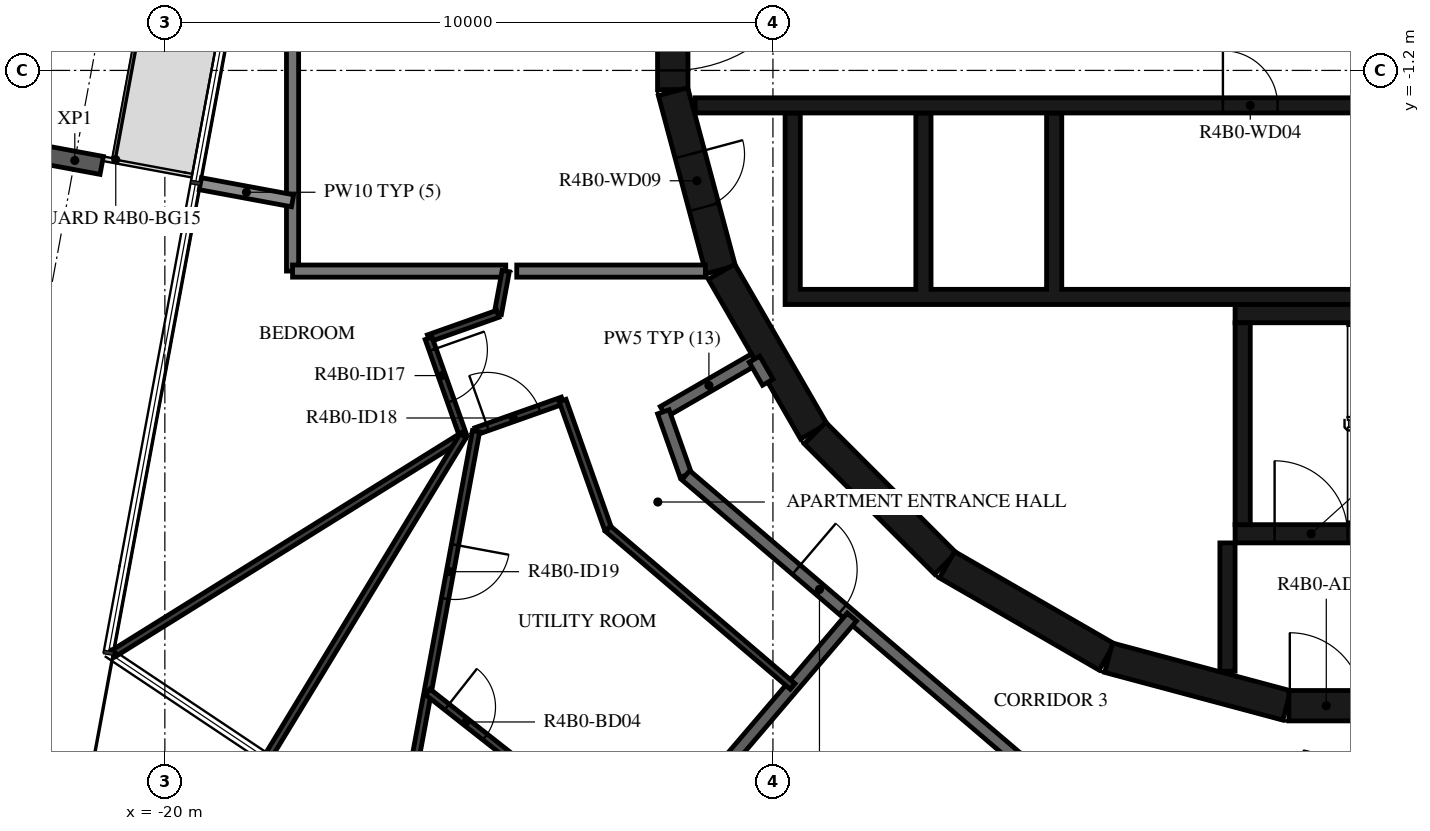
"""IFC4 building model, lengths in metres.
Left out: names, types, materials, properties, quantities, classifications, styles, units other than length and angle.
Written with IfcOpenShell. Run it as: python <this file> out.ifc"""

import sys

from ifc_helpers import new_model, si_unit, direction, frame, frame_2d, origin, origin_2d, place, context, subcontext, project, spatial, polyline, rectangle, i_section, outline, extrude, element, fill, save


model = new_model("IFC4")
c1 = context("Model", 3, precision=1e-05, world=origin(), true_north=direction((0.0, 1.0)))
c2 = subcontext(c1, "Body", "Model", "MODEL_VIEW")
j1 = project(units=[si_unit("LENGTHUNIT", "METRE"), si_unit("PLANEANGLEUNIT", "RADIAN")], contexts=[c1])
p1 = place(None, origin())
s1 = spatial("IfcSite", under=j1, at=p1, CompositionType="ELEMENT")
p2 = place(p1, origin())
s2 = spatial("IfcBuilding", under=s1, at=p2, CompositionType="ELEMENT")
p3 = place(p2, frame((0.0, 0.0, 165.7)))
s3 = spatial("IfcBuildingStorey", under=s2, at=p3, CompositionType="ELEMENT", Elevation=165.7)
p4 = place(p3, frame((-21.481, -2.68, -0.38), z_axis=(0.0, 0.0, 1.0), x_axis=(0.182235967681, 0.983254825609, 0.0)))
e1 = element("IfcColumn", 1, at=p4, inside=s3, PredefinedType="COLUMN", context=c2, shape_type="SweptSolid", body=[
    extrude(i_section(OverallWidth=0.3, OverallDepth=0.9, WebThickness=0.019, FlangeThickness=0.035, FilletRadius=0.03, at=origin_2d()), origin(), (0.0, 0.0, 1.0), 3.5),
])
p5 = place(p3, frame((-11.647, 1.516, 0.0), z_axis=(0.0, 0.0, 1.0), x_axis=(0.0, -1.0, 0.0)))
e2 = element("IfcWall", 2, at=p5, inside=s3, PredefinedType="SHEAR", context=c2, shape_type="SweptSolid", body=[
    extrude(rectangle(XDim=3.033, YDim=0.5, at=frame_2d((1.516, 0.0))), origin(), (0.0, 0.0, 1.0), 3.12),
])
p6 = place(p5, frame((0.316, 0.0, 0.0)))
e3 = element("IfcOpeningElement", 3, at=p6, cuts=e2, PredefinedType="OPENING", context=c2, shape_type="SweptSolid", body=[
    extrude(rectangle(XDim=2.4, YDim=2.1, at=frame_2d((1.2, 1.05))), frame((0.0, 0.26, 0.0), z_axis=(0.0, -1.0, 0.0), x_axis=(1.0, 0.0, 0.0)), (0.0, 0.0, 1.0), 0.52),
])
p7 = place(p3, frame((-11.643, -1.55, 0.0), z_axis=(0.0, 0.0, 1.0), x_axis=(0.258734743916, -0.965948410781, 0.0)))
e4 = element("IfcWall", 4, at=p7, inside=s3, PredefinedType="SHEAR", context=c2, shape_type="SweptSolid", body=[
    extrude(rectangle(XDim=3.033, YDim=0.5, at=frame_2d((1.516, 0.0))), origin(), (0.0, 0.0, 1.0), 3.12),
])
p8 = place(p7, frame((1.066, 0.0, 0.0)))
e5 = element("IfcOpeningElement", 5, at=p8, cuts=e4, PredefinedType="OPENING", context=c2, shape_type="SweptSolid", body=[
    extrude(rectangle(XDim=0.9, YDim=2.1, at=frame_2d((0.45, 1.05))), frame((0.0, 0.26, 0.0), z_axis=(0.0, -1.0, 0.0), x_axis=(1.0, 0.0, 0.0)), (0.0, 0.0, 1.0), 0.52),
])
p9 = place(p3, frame((-10.845, -4.51, 0.0), z_axis=(0.0, 0.0, 1.0), x_axis=(0.500087131594, -0.865975092491, 0.0)))
e6 = element("IfcWall", 6, at=p9, inside=s3, PredefinedType="SHEAR", context=c2, shape_type="SweptSolid", body=[
    extrude(rectangle(XDim=3.033, YDim=0.5, at=frame_2d((1.516, 0.0))), origin(), (0.0, 0.0, 1.0), 3.12),
])
p10 = place(p3, frame((-9.308, -7.164, 0.0), z_axis=(0.0, 0.0, 1.0), x_axis=(0.707106781187, -0.707106781187, 0.0)))
e7 = element("IfcWall", 7, at=p10, inside=s3, PredefinedType="SHEAR", context=c2, shape_type="SweptSolid", body=[
    extrude(rectangle(XDim=3.032, YDim=0.5, at=frame_2d((1.516, 0.0))), origin(), (0.0, 0.0, 1.0), 3.12),
])
for number, where, z_axis, x_axis in (
    (8, (-7.137, -9.329, 0.0), (0.0, 0.0, 1.0), (0.866, -0.5, 0.0)),
    (9, (-4.479, -10.858, 0.0), (0.0, 0.0, 1.0), (0.966, -0.259, 0.0)),
):
    element("IfcWall", number, at=place(p3, frame(where, z_axis=z_axis, x_axis=x_axis)), inside=s3, PredefinedType="SHEAR", context=c2, shape_type="SweptSolid", body=[
        extrude(rectangle(XDim=3.033, YDim=0.5, at=frame_2d((1.516, 0.0))), origin(), (0.0, 0.0, 1.0), 3.12),
    ])
p11 = place(p3, frame((-1.516, -11.647, 0.0), z_axis=(0.0, 0.0, 1.0), x_axis=(1.0, 0.0, 0.0)))
e10 = element("IfcWall", 10, at=p11, inside=s3, PredefinedType="SHEAR", context=c2, shape_type="SweptSolid", body=[
    extrude(rectangle(XDim=3.033, YDim=0.5, at=frame_2d((1.516, 0.0))), origin(), (0.0, 0.0, 1.0), 3.12),
])
p12 = place(p11, frame((0.016, 0.0, 0.0)))
e11 = element("IfcOpeningElement", 11, at=p12, cuts=e10, PredefinedType="OPENING", context=c2, shape_type="SweptSolid", body=[
    extrude(rectangle(XDim=1.2, YDim=2.1, at=frame_2d((0.6, 1.05))), frame((0.0, 0.26, 0.0), z_axis=(0.0, -1.0, 0.0), x_axis=(1.0, 0.0, 0.0)), (0.0, 0.0, 1.0), 0.52),
])
p13 = place(p3, frame((-2.275, -8.67, 0.0), z_axis=(0.0, 0.0, 1.0), x_axis=(0.0, 1.0, 0.0)))
e12 = element("IfcWall", 12, at=p13, inside=s3, PredefinedType="SHEAR", context=c2, shape_type="SweptSolid", body=[
    extrude(rectangle(XDim=3.32, YDim=0.25, at=frame_2d((1.66, 0.0))), origin(), (0.0, 0.0, 1.0), 3.12),
])
p14 = place(p3, frame((-2.4, -5.2, 0.0), z_axis=(0.0, 0.0, 1.0), x_axis=(1.0, 0.0, 0.0)))
e13 = element("IfcWall", 13, at=p14, inside=s3, PredefinedType="SHEAR", context=c2, shape_type="SweptSolid", body=[
    extrude(rectangle(XDim=7.05, YDim=0.3, at=frame_2d((3.525, 0.0))), origin(), (0.0, 0.0, 1.0), 3.12),
])
p15 = place(p3, frame((-2.4, -8.82, 0.0), z_axis=(0.0, 0.0, 1.0), x_axis=(1.0, 0.0, 0.0)))
e14 = element("IfcWall", 14, at=p15, inside=s3, PredefinedType="SHEAR", context=c2, shape_type="SweptSolid", body=[
    extrude(rectangle(XDim=2.5, YDim=0.3, at=frame_2d((1.25, 0.0))), origin(), (0.0, 0.0, 1.0), 3.12),
])
p16 = place(p15, frame((0.65, 0.0, 0.0)))
e15 = element("IfcOpeningElement", 15, at=p16, cuts=e14, PredefinedType="OPENING", context=c2, shape_type="SweptSolid", body=[
    extrude(rectangle(XDim=1.2, YDim=2.1, at=frame_2d((0.6, 1.05))), frame((0.0, 0.16, 0.0), z_axis=(0.0, -1.0, 0.0), x_axis=(1.0, 0.0, 0.0)), (0.0, 0.0, 1.0), 0.32),
])
p17 = place(p3, frame((-2.525, -8.97, 0.0), z_axis=(0.0, 0.0, 1.0), x_axis=(0.0, -1.0, 0.0)))
e16 = element("IfcWall", 16, at=p17, inside=s3, PredefinedType="SHEAR", context=c2, shape_type="SweptSolid", body=[
    extrude(rectangle(XDim=2.11, YDim=0.25, at=frame_2d((1.055, 0.0))), origin(), (0.0, 0.0, 1.0), 3.12),
])
p18 = place(p3, origin())
e17 = element("IfcWall", 17, at=p18, inside=s3, PredefinedType="SHEAR", context=c2, shape_type="SweptSolid", body=[
    extrude(outline(polyline([(9.8, -5.05), (9.8, -4.8), (9.8, -1.9), (9.55, -1.9), (9.55, -4.8), (7.65, -4.8), (7.65, -1.9), (7.4, -1.9), (7.4, -4.8), (5.5, -4.8), (5.5, -1.9), (5.25, -1.9), (5.25, -4.8), (3.35, -4.8), (3.35, -1.9), (3.1, -1.9), (3.1, -4.8), (1.2, -4.8), (1.2, -1.9), (0.95, -1.9), (0.95, -4.8), (-5.25, -4.8), (-5.25, -1.9), (-5.5, -1.9), (-5.5, -4.8), (-7.4, -4.8), (-7.4, -1.9), (-7.65, -1.9), (-7.65, -4.8), (-9.55, -4.8), (-9.55, -1.9), (-9.8, -1.9), (-9.8, -4.8), (-9.8, -5.05), (9.8, -5.05)])), origin(), (0.0, 0.0, 1.0), 3.12),
])
p19 = place(p3, frame((-11.28, -1.775, 0.0), z_axis=(0.0, 0.0, 1.0), x_axis=(1.0, 0.0, 0.0)))
e18 = element("IfcWall", 18, at=p19, inside=s3, PredefinedType="SHEAR", context=c2, shape_type="SweptSolid", body=[
    extrude(rectangle(XDim=14.38, YDim=0.25, at=frame_2d((7.19, 0.0))), origin(), (0.0, 0.0, 1.0), 3.12),
])
p20 = place(p19, frame((12.88, 0.0, 0.0)))
e19 = element("IfcOpeningElement", 19, at=p20, cuts=e18, PredefinedType="OPENING", context=c2, shape_type="SweptSolid", body=[
    extrude(rectangle(XDim=1.1, YDim=2.1, at=frame_2d((0.55, 1.05))), frame((0.0, 0.135, 0.0), z_axis=(0.0, -1.0, 0.0), x_axis=(1.0, 0.0, 0.0)), (0.0, 0.0, 1.0), 0.27),
])
p21 = place(p19, frame((8.68, 0.0, 0.0)))
e20 = element("IfcOpeningElement", 20, at=p21, cuts=e18, PredefinedType="OPENING", context=c2, shape_type="SweptSolid", body=[
    extrude(rectangle(XDim=0.9, YDim=2.1, at=frame_2d((0.45, 1.05))), frame((0.0, 0.135, 0.0), z_axis=(0.0, -1.0, 0.0), x_axis=(1.0, 0.0, 0.0)), (0.0, 0.0, 1.0), 0.27),
])
p22 = place(p3, frame((-10.303, -5.949, 0.0), z_axis=(0.0, 0.0, 1.0), x_axis=(-0.866021168401, -0.500007335828, 0.0)))
e21 = element("IfcWall", 21, at=p22, inside=s3, PredefinedType="STANDARD", context=c2, shape_type="SweptSolid", body=[
    extrude(rectangle(XDim=1.731, YDim=0.2, at=frame_2d((0.865, 0.0))), origin(), (0.0, 0.0, 1.0), 3.12),
])
p23 = place(p3, frame((-11.802, -6.814, 0.0), z_axis=(0.0, 0.0, 1.0), x_axis=(0.333904297771, -0.942606980629, 0.0)))
e22 = element("IfcWall", 22, at=p23, inside=s3, PredefinedType="STANDARD", context=c2, shape_type="SweptSolid", body=[
    extrude(rectangle(XDim=1.107, YDim=0.2, at=frame_2d((0.553, 0.0))), origin(), (0.0, 0.0, 1.0), 3.12),
])
p24 = place(p3, frame((-11.433, -7.858, 0.0), z_axis=(0.0, 0.0, 1.0), x_axis=(0.760412154545, -0.649440801937, 0.0)))
e23 = element("IfcWall", 23, at=p24, inside=s3, PredefinedType="STANDARD", context=c2, shape_type="SweptSolid", body=[
    extrude(rectangle(XDim=7.181, YDim=0.2, at=frame_2d((3.59, 0.0))), origin(), (0.0, 0.0, 1.0), 3.12),
])
p25 = place(p24, frame((2.39, 0.0, 0.0)))
e24 = element("IfcOpeningElement", 24, at=p25, cuts=e23, PredefinedType="OPENING", context=c2, shape_type="SweptSolid", body=[
    extrude(rectangle(XDim=1.0, YDim=2.1, at=frame_2d((0.5, 1.05))), frame((0.0, 0.11, 0.0), z_axis=(0.0, -1.0, 0.0), x_axis=(1.0, 0.0, 0.0)), (0.0, 0.0, 1.0), 0.22),
])
p26 = place(p3, frame((-10.303, -5.949, 0.0), z_axis=(0.0, 0.0, 1.0), x_axis=(0.499980071345, -0.866036909293, 0.0)))
e25 = element("IfcWall", 25, at=p26, inside=s3, PredefinedType="STANDARD", context=c2, shape_type="SweptSolid", body=[
    extrude(rectangle(XDim=0.438, YDim=0.2, at=frame_2d((0.219, 0.0))), origin(), (0.0, 0.0, 1.0), 3.12),
])
p27 = place(p3, frame((-17.9, 4.5, 0.0), z_axis=(0.0, 0.0, 1.0), x_axis=(0.0, -1.0, 0.0)))
e26 = element("IfcWall", 26, at=p27, inside=s3, PredefinedType="STANDARD", context=c2, shape_type="SweptSolid", body=[
    extrude(rectangle(XDim=9.0, YDim=0.2, at=frame_2d((4.5, 0.0))), origin(), (0.0, 0.0, 1.0), 3.12),
])
p28 = place(p3, frame((-14.213, -4.5, 0.0), z_axis=(0.0, 0.0, 1.0), x_axis=(1.0, 0.0, 0.0)))
e27 = element("IfcWall", 27, at=p28, inside=s3, PredefinedType="STANDARD", context=c2, shape_type="SweptSolid", body=[
    extrude(rectangle(XDim=3.102, YDim=0.2, at=frame_2d((1.551, 0.0))), origin(), (0.0, 0.0, 1.0), 3.12),
])
p29 = place(p3, frame((-17.9, -4.5, 0.0), z_axis=(0.0, 0.0, 1.0), x_axis=(1.0, 0.0, 0.0)))
e28 = element("IfcWall", 28, at=p29, inside=s3, PredefinedType="STANDARD", context=c2, shape_type="SweptSolid", body=[
    extrude(rectangle(XDim=3.506, YDim=0.2, at=frame_2d((1.753, 0.0))), origin(), (0.0, 0.0, 1.0), 3.12),
])
p30 = place(p3, frame((-19.416, -3.063, 0.0), z_axis=(0.0, 0.0, 1.0), x_axis=(0.983258901558, -0.182213974512, 0.0)))
e29 = element("IfcWall", 29, at=p30, inside=s3, PredefinedType="STANDARD", context=c2, shape_type="SweptSolid", body=[
    extrude(rectangle(XDim=1.542, YDim=0.2, at=frame_2d((0.771, 0.0))), origin(), (0.0, 0.0, 1.0), 2.73),
])
p31 = place(p3, frame((-12.441, -14.569, 0.0), z_axis=(0.0, 0.0, 1.0), x_axis=(0.649446013128, 0.760407703822, 0.0)))
e30 = element("IfcWall", 30, at=p31, inside=s3, PredefinedType="STANDARD", context=c2, shape_type="SweptSolid", body=[
    extrude(rectangle(XDim=5.758, YDim=0.2, at=frame_2d((2.879, 0.0))), origin(), (0.0, 0.0, 1.0), 3.12),
])
p32 = place(p3, frame((-14.394, -4.5, 0.0), z_axis=(0.0, 0.0, 1.0), x_axis=(-0.182101494457, -0.983279739299, 0.0)))
e31 = element("IfcWall", 31, at=p32, inside=s3, PredefinedType="PARTITIONING", context=c2, shape_type="SweptSolid", body=[
    extrude(rectangle(XDim=0.715, YDim=0.12, at=frame_2d((0.357, 0.0))), origin(), (0.0, 0.0, 1.0), 3.12),
])
p33 = place(p3, frame((-14.524, -5.203, 0.0), z_axis=(0.0, 0.0, 1.0), x_axis=(-0.942657704592, -0.333761070187, 0.0)))
e32 = element("IfcWall", 32, at=p33, inside=s3, PredefinedType="PARTITIONING", context=c2, shape_type="SweptSolid", body=[
    extrude(rectangle(XDim=1.208, YDim=0.12, at=frame_2d((0.604, 0.0))), origin(), (0.0, 0.0, 1.0), 3.12),
])
p34 = place(p3, frame((-15.663, -5.606, 0.0), z_axis=(0.0, 0.0, 1.0), x_axis=(0.333751436931, -0.942661115325, 0.0)))
e33 = element("IfcWall", 33, at=p34, inside=s3, PredefinedType="PARTITIONING", context=c2, shape_type="SweptSolid", body=[
    extrude(rectangle(XDim=1.7, YDim=0.12, at=frame_2d((0.85, 0.0))), origin(), (0.0, 0.0, 1.0), 3.12),
])
p35 = place(p34, frame((0.2, 0.0, 0.0)))
e34 = element("IfcOpeningElement", 34, at=p35, cuts=e33, PredefinedType="OPENING", context=c2, shape_type="SweptSolid", body=[
    extrude(rectangle(XDim=0.9, YDim=2.1, at=frame_2d((0.45, 1.05))), frame((0.0, 0.07, 0.0), z_axis=(0.0, -1.0, 0.0), x_axis=(1.0, 0.0, 0.0)), (0.0, 0.0, 1.0), 0.14),
])
p36 = place(p3, frame((-14.882, -7.133, 0.0), z_axis=(0.0, 0.0, 1.0), x_axis=(0.942631466676, 0.333835165961, 0.0)))
e35 = element("IfcWall", 35, at=p36, inside=s3, PredefinedType="PARTITIONING", context=c2, shape_type="SweptSolid", body=[
    extrude(rectangle(XDim=1.51, YDim=0.12, at=frame_2d((0.755, 0.0))), origin(), (0.0, 0.0, 1.0), 3.12),
])
p37 = place(p36, frame((0.2, 0.0, 0.0)))
e36 = element("IfcOpeningElement", 36, at=p37, cuts=e35, PredefinedType="OPENING", context=c2, shape_type="SweptSolid", body=[
    extrude(rectangle(XDim=0.9, YDim=2.1, at=frame_2d((0.45, 1.05))), frame((0.0, 0.07, 0.0), z_axis=(0.0, -1.0, 0.0), x_axis=(1.0, 0.0, 0.0)), (0.0, 0.0, 1.0), 0.14),
])
p38 = place(p3, frame((-13.459, -6.629, 0.0), z_axis=(0.0, 0.0, 1.0), x_axis=(0.333790565501, -0.942647260847, 0.0)))
e37 = element("IfcWall", 37, at=p38, inside=s3, PredefinedType="PARTITIONING", context=c2, shape_type="SweptSolid", body=[
    extrude(rectangle(XDim=2.237, YDim=0.12, at=frame_2d((1.118, 0.0))), origin(), (0.0, 0.0, 1.0), 3.12),
])
p39 = place(p3, frame((-12.713, -8.737, 0.0), z_axis=(0.0, 0.0, 1.0), x_axis=(0.760420863476, -0.649430604754, 0.0)))
e38 = element("IfcWall", 38, at=p39, inside=s3, PredefinedType="PARTITIONING", context=c2, shape_type="SweptSolid", body=[
    extrude(rectangle(XDim=3.992, YDim=0.12, at=frame_2d((1.996, 0.0))), origin(), (0.0, 0.0, 1.0), 3.12),
])
p40 = place(p3, frame((-20.849, -10.792, 0.0), z_axis=(0.0, 0.0, 1.0), x_axis=(0.848835001009, 0.528657867682, 0.0)))
e39 = element("IfcWall", 39, at=p40, inside=s3, PredefinedType="PARTITIONING", context=c2, shape_type="SweptSolid", body=[
    extrude(rectangle(XDim=6.778, YDim=0.12, at=frame_2d((3.389, 0.0))), origin(), (0.0, 0.0, 1.0), 3.12),
])
p41 = place(p3, frame((-21.461, -17.671, 0.0), z_axis=(0.0, 0.0, 1.0), x_axis=(0.519791999186, 0.854292852353, 0.0)))
e40 = element("IfcWall", 40, at=p41, inside=s3, PredefinedType="PARTITIONING", context=c2, shape_type="SweptSolid", body=[
    extrude(rectangle(XDim=12.247, YDim=0.12, at=frame_2d((6.124, 0.0))), origin(), (0.0, 0.0, 1.0), 3.12),
])
p42 = place(p41, frame((1.0, 0.0, 0.0)))
e41 = element("IfcOpeningElement", 41, at=p42, cuts=e40, PredefinedType="OPENING", context=c2, shape_type="SweptSolid", body=[
    extrude(rectangle(XDim=0.9, YDim=2.1, at=frame_2d((0.45, 1.05))), frame((0.0, 0.07, 0.0), z_axis=(0.0, -1.0, 0.0), x_axis=(1.0, 0.0, 0.0)), (0.0, 0.0, 1.0), 0.14),
])
p43 = place(p3, frame((-14.882, -7.133, 0.0), z_axis=(0.0, 0.0, 1.0), x_axis=(-0.182231858218, -0.983255587246, 0.0)))
e42 = element("IfcWall", 42, at=p43, inside=s3, PredefinedType="PARTITIONING", context=c2, shape_type="SweptSolid", body=[
    extrude(rectangle(XDim=8.215, YDim=0.12, at=frame_2d((4.107, 0.0))), origin(), (0.0, 0.0, 1.0), 3.12),
])
p44 = place(p43, frame((1.9, 0.0, 0.0)))
e43 = element("IfcOpeningElement", 43, at=p44, cuts=e42, PredefinedType="OPENING", context=c2, shape_type="SweptSolid", body=[
    extrude(rectangle(XDim=0.9, YDim=2.1, at=frame_2d((0.45, 1.05))), frame((0.0, 0.07, 0.0), z_axis=(0.0, -1.0, 0.0), x_axis=(1.0, 0.0, 0.0)), (0.0, 0.0, 1.0), 0.14),
])
p45 = place(p3, frame((-15.677, -11.42, 0.0), z_axis=(0.0, 0.0, 1.0), x_axis=(0.785821888461, -0.618452875824, 0.0)))
e44 = element("IfcWall", 44, at=p45, inside=s3, PredefinedType="PARTITIONING", context=c2, shape_type="SweptSolid", body=[
    extrude(rectangle(XDim=4.507, YDim=0.12, at=frame_2d((2.254, 0.0))), origin(), (0.0, 0.0, 1.0), 3.12),
])
p46 = place(p45, frame((0.4, 0.0, 0.0)))
e45 = element("IfcOpeningElement", 45, at=p46, cuts=e44, PredefinedType="OPENING", context=c2, shape_type="SweptSolid", body=[
    extrude(rectangle(XDim=0.8, YDim=2.1, at=frame_2d((0.4, 1.05))), frame((0.0, 0.07, 0.0), z_axis=(0.0, -1.0, 0.0), x_axis=(1.0, 0.0, 0.0)), (0.0, 0.0, 1.0), 0.14),
])
p47 = place(p16, origin())
e46 = element("IfcDoor", 46, at=p47, inside=s3, OperationType="SINGLE_SWING_LEFT", PredefinedType="DOOR", context=c2, shape_type="SweptSolid", body=[
    extrude(rectangle(XDim=1.2, YDim=2.1, at=frame_2d((0.6, 1.05))), frame((0.0, 0.025, 0.0), z_axis=(0.0, -1.0, 0.0), x_axis=(1.0, 0.0, 0.0)), (0.0, 0.0, 1.0), 0.05),
])
fill(e15, e46)
p48 = place(p12, origin())
e47 = element("IfcDoor", 47, at=p48, inside=s3, OperationType="SINGLE_SWING_RIGHT", PredefinedType="DOOR", context=c2, shape_type="SweptSolid", body=[
    extrude(rectangle(XDim=1.2, YDim=2.1, at=frame_2d((0.6, 1.05))), frame((0.0, 0.025, 0.0), z_axis=(0.0, -1.0, 0.0), x_axis=(1.0, 0.0, 0.0)), (0.0, 0.0, 1.0), 0.05),
])
fill(e11, e47)
p49 = place(p6, origin())
e48 = element("IfcDoor", 48, at=p49, inside=s3, OperationType="DOUBLE_DOOR_SINGLE_SWING", PredefinedType="DOOR", context=c2, shape_type="SweptSolid", body=[
    extrude(rectangle(XDim=2.4, YDim=2.1, at=frame_2d((1.2, 1.05))), frame((0.0, 0.025, 0.0), z_axis=(0.0, -1.0, 0.0), x_axis=(1.0, 0.0, 0.0)), (0.0, 0.0, 1.0), 0.05),
])
fill(e3, e48)
p50 = place(p21, origin())
e49 = element("IfcDoor", 49, at=p50, inside=s3, OperationType="SINGLE_SWING_RIGHT", PredefinedType="DOOR", context=c2, shape_type="SweptSolid", body=[
    extrude(rectangle(XDim=0.9, YDim=2.1, at=frame_2d((0.45, 1.05))), frame((0.0, 0.025, 0.0), z_axis=(0.0, -1.0, 0.0), x_axis=(1.0, 0.0, 0.0)), (0.0, 0.0, 1.0), 0.05),
])
fill(e20, e49)
p51 = place(p8, origin())
e50 = element("IfcDoor", 50, at=p51, inside=s3, OperationType="SINGLE_SWING_LEFT", PredefinedType="DOOR", context=c2, shape_type="SweptSolid", body=[
    extrude(rectangle(XDim=0.9, YDim=2.1, at=frame_2d((0.45, 1.05))), frame((0.0, 0.025, 0.0), z_axis=(0.0, -1.0, 0.0), x_axis=(1.0, 0.0, 0.0)), (0.0, 0.0, 1.0), 0.05),
])
fill(e5, e50)
p52 = place(p25, origin())
e51 = element("IfcDoor", 51, at=p52, inside=s3, OperationType="SINGLE_SWING_RIGHT", PredefinedType="DOOR", context=c2, shape_type="SweptSolid", body=[
    extrude(rectangle(XDim=1.0, YDim=2.1, at=frame_2d((0.5, 1.05))), frame((0.0, 0.025, 0.0), z_axis=(0.0, -1.0, 0.0), x_axis=(1.0, 0.0, 0.0)), (0.0, 0.0, 1.0), 0.05),
])
fill(e24, e51)
p53 = place(p35, origin())
e52 = element("IfcDoor", 52, at=p53, inside=s3, OperationType="SINGLE_SWING_RIGHT", PredefinedType="DOOR", context=c2, shape_type="SweptSolid", body=[
    extrude(rectangle(XDim=0.9, YDim=2.1, at=frame_2d((0.45, 1.05))), frame((0.0, 0.025, 0.0), z_axis=(0.0, -1.0, 0.0), x_axis=(1.0, 0.0, 0.0)), (0.0, 0.0, 1.0), 0.05),
])
fill(e34, e52)
p54 = place(p37, origin())
e53 = element("IfcDoor", 53, at=p54, inside=s3, OperationType="SINGLE_SWING_LEFT", PredefinedType="DOOR", context=c2, shape_type="SweptSolid", body=[
    extrude(rectangle(XDim=0.9, YDim=2.1, at=frame_2d((0.45, 1.05))), frame((0.0, 0.025, 0.0), z_axis=(0.0, -1.0, 0.0), x_axis=(1.0, 0.0, 0.0)), (0.0, 0.0, 1.0), 0.05),
])
fill(e36, e53)
p55 = place(p44, origin())
e54 = element("IfcDoor", 54, at=p55, inside=s3, OperationType="SINGLE_SWING_RIGHT", PredefinedType="DOOR", context=c2, shape_type="SweptSolid", body=[
    extrude(rectangle(XDim=0.9, YDim=2.1, at=frame_2d((0.45, 1.05))), frame((0.0, 0.025, 0.0), z_axis=(0.0, -1.0, 0.0), x_axis=(1.0, 0.0, 0.0)), (0.0, 0.0, 1.0), 0.05),
])
fill(e43, e54)
p56 = place(p46, origin())
e55 = element("IfcDoor", 55, at=p56, inside=s3, OperationType="SINGLE_SWING_RIGHT", PredefinedType="DOOR", context=c2, shape_type="SweptSolid", body=[
    extrude(rectangle(XDim=0.8, YDim=2.1, at=frame_2d((0.4, 1.05))), frame((0.0, 0.025, 0.0), z_axis=(0.0, -1.0, 0.0), x_axis=(1.0, 0.0, 0.0)), (0.0, 0.0, 1.0), 0.05),
])
fill(e45, e55)
save(model, sys.argv[1])
